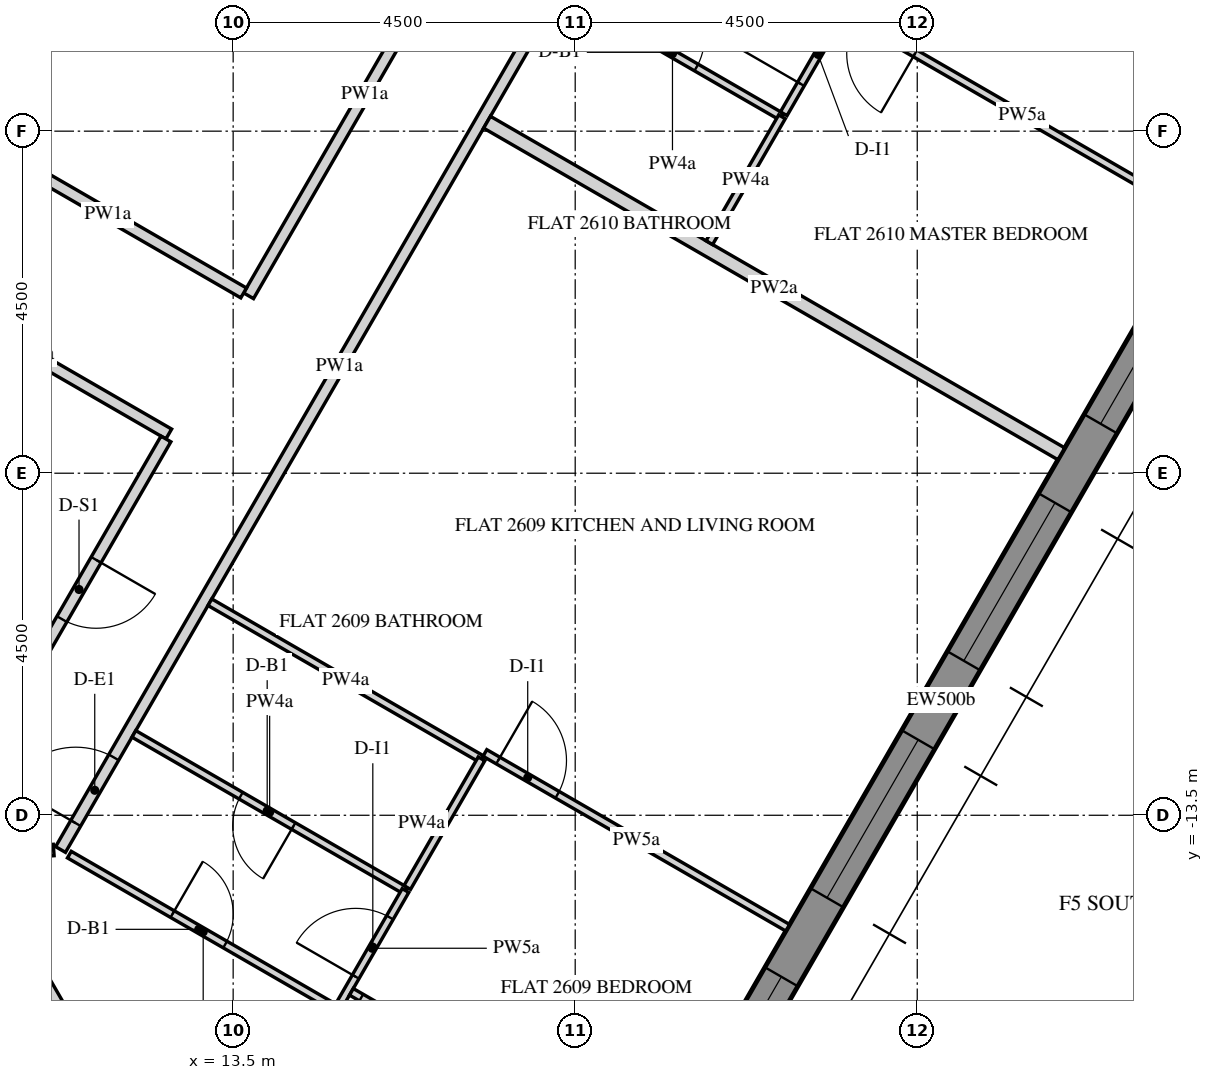
"""IFC4 building model, lengths in metres.
Left out: names, types, materials, properties, quantities, classifications, styles, units other than length and angle.
Written with IfcOpenShell. Run it as: python <this file> out.ifc"""

import sys

from ifc_helpers import new_model, si_unit, direction, frame, frame_2d, origin, place, context, subcontext, project, spatial, polyline, rectangle, outline, extrude, element, fill, save


model = new_model("IFC4")
c1 = context("Model", 3, precision=1e-05, world=origin(), true_north=direction((0.0, 1.0)))
c2 = subcontext(c1, "Body", "Model", "MODEL_VIEW")
j1 = project(units=[si_unit("LENGTHUNIT", "METRE"), si_unit("PLANEANGLEUNIT", "RADIAN")], contexts=[c1])
p1 = place(None, origin())
s1 = spatial("IfcSite", under=j1, at=p1, CompositionType="ELEMENT")
p2 = place(p1, origin())
s2 = spatial("IfcBuilding", under=s1, at=p2, CompositionType="ELEMENT")
p3 = place(p2, frame((0.0, 0.0, 334.2)))
s3 = spatial("IfcBuildingStorey", under=s2, at=p3, CompositionType="ELEMENT", Elevation=334.2)
p4 = place(p3, frame((16.451, -23.005, -0.15), z_axis=(0.0, 0.0, 1.0), x_axis=(0.500003737743, 0.866023245787, 0.0)))
e1 = element("IfcWall", 1, at=p4, inside=s3, PredefinedType="SOLIDWALL", context=c2, shape_type="SweptSolid", body=[
    extrude(outline(polyline([(-0.021, -0.25), (25.468, -0.25), (25.421, 0.25), (0.021, 0.25), (-0.021, -0.25)])), origin(), (0.0, 0.0, 1.0), 3.75),
])
p5 = place(p4, frame((2.522, 0.0, 0.75)))
e2 = element("IfcOpeningElement", 2, at=p5, cuts=e1, PredefinedType="OPENING", context=c2, shape_type="SweptSolid", body=[
    extrude(rectangle(XDim=2.4, YDim=2.7, at=frame_2d((1.2, 1.35))), frame((0.0, 0.26, 0.0), z_axis=(0.0, -1.0, 0.0), x_axis=(1.0, 0.0, 0.0)), (0.0, 0.0, 1.0), 0.52),
])
p6 = place(p4, frame((6.122, 0.0, 0.75)))
e3 = element("IfcOpeningElement", 3, at=p6, cuts=e1, PredefinedType="OPENING", context=c2, shape_type="SweptSolid", body=[
    extrude(rectangle(XDim=2.4, YDim=2.7, at=frame_2d((1.2, 1.35))), frame((0.0, 0.26, 0.0), z_axis=(0.0, -1.0, 0.0), x_axis=(1.0, 0.0, 0.0)), (0.0, 0.0, 1.0), 0.52),
])
p7 = place(p4, frame((9.722, 0.0, 0.75)))
e4 = element("IfcOpeningElement", 4, at=p7, cuts=e1, PredefinedType="OPENING", context=c2, shape_type="SweptSolid", body=[
    extrude(rectangle(XDim=2.4, YDim=2.7, at=frame_2d((1.2, 1.35))), frame((0.0, 0.26, 0.0), z_axis=(0.0, -1.0, 0.0), x_axis=(1.0, 0.0, 0.0)), (0.0, 0.0, 1.0), 0.52),
])
p8 = place(p4, frame((13.323, 0.0, 0.75)))
e5 = element("IfcOpeningElement", 5, at=p8, cuts=e1, PredefinedType="OPENING", context=c2, shape_type="SweptSolid", body=[
    extrude(rectangle(XDim=2.4, YDim=2.7, at=frame_2d((1.2, 1.35))), frame((0.0, 0.26, 0.0), z_axis=(0.0, -1.0, 0.0), x_axis=(1.0, 0.0, 0.0)), (0.0, 0.0, 1.0), 0.52),
])
p9 = place(p4, frame((16.922, 0.0, 0.75)))
e6 = element("IfcOpeningElement", 6, at=p9, cuts=e1, PredefinedType="OPENING", context=c2, shape_type="SweptSolid", body=[
    extrude(rectangle(XDim=2.4, YDim=2.7, at=frame_2d((1.2, 1.35))), frame((0.0, 0.26, 0.0), z_axis=(0.0, -1.0, 0.0), x_axis=(1.0, 0.0, 0.0)), (0.0, 0.0, 1.0), 0.52),
])
p10 = place(p4, frame((20.522, 0.0, 0.75)))
e7 = element("IfcOpeningElement", 7, at=p10, cuts=e1, PredefinedType="OPENING", context=c2, shape_type="SweptSolid", body=[
    extrude(rectangle(XDim=2.4, YDim=2.7, at=frame_2d((1.2, 1.35))), frame((0.0, 0.26, 0.0), z_axis=(0.0, -1.0, 0.0), x_axis=(1.0, 0.0, 0.0)), (0.0, 0.0, 1.0), 0.52),
])
p11 = place(p3, frame((6.235, -10.8, -0.15), z_axis=(0.0, 0.0, 1.0), x_axis=(0.499996419489, 0.866027470984, 0.0)))
e8 = element("IfcWall", 8, at=p11, inside=s3, PredefinedType="SHEAR", context=c2, shape_type="SweptSolid", body=[
    extrude(outline(polyline([(-0.115, -0.2), (12.586, -0.2), (12.355, 0.2), (0.115, 0.2), (-0.115, -0.2)])), origin(), (0.0, 0.0, 1.0), 3.75),
])
p12 = place(p11, frame((5.364, 0.0, 0.15)))
e9 = element("IfcOpeningElement", 9, at=p12, cuts=e8, PredefinedType="OPENING", context=c2, shape_type="SweptSolid", body=[
    extrude(rectangle(XDim=1.8, YDim=2.4, at=frame_2d((0.9, 1.2))), frame((0.0, 0.21, 0.0), z_axis=(0.0, -1.0, 0.0), x_axis=(1.0, 0.0, 0.0)), (0.0, 0.0, 1.0), 0.42),
])
p13 = place(p3, frame((6.351, -11.0, -0.15), z_axis=(0.0, 0.0, 1.0), x_axis=(0.499998894578, -0.866026041999, 0.0)))
e10 = element("IfcWall", 10, at=p13, inside=s3, PredefinedType="SHEAR", context=c2, shape_type="SweptSolid", body=[
    extrude(rectangle(XDim=15.544, YDim=0.4, at=frame_2d((7.772, 0.0))), origin(), (0.0, 0.0, 1.0), 3.75),
])
p14 = place(p13, frame((6.872, 0.0, 0.15)))
e11 = element("IfcOpeningElement", 11, at=p14, cuts=e10, PredefinedType="OPENING", context=c2, shape_type="SweptSolid", body=[
    extrude(rectangle(XDim=1.8, YDim=2.4, at=frame_2d((0.9, 1.2))), frame((0.0, 0.21, 0.0), z_axis=(0.0, -1.0, 0.0), x_axis=(1.0, 0.0, 0.0)), (0.0, 0.0, 1.0), 0.42),
])
p15 = place(p3, frame((11.229, -13.951, 0.0), z_axis=(0.0, 0.0, 1.0), x_axis=(0.499997948852, 0.866026588012, 0.0)))
e12 = element("IfcWall", 12, at=p15, inside=s3, PredefinedType="PARTITIONING", context=c2, shape_type="SweptSolid", body=[
    extrude(rectangle(XDim=14.677, YDim=0.15, at=frame_2d((7.339, 0.0))), origin(), (0.0, 0.0, 1.0), 2.838),
])
p16 = place(p15, frame((0.4, 0.0, 0.0)))
e13 = element("IfcOpeningElement", 13, at=p16, cuts=e12, PredefinedType="OPENING", context=c2, shape_type="SweptSolid", body=[
    extrude(rectangle(XDim=1.0, YDim=2.1, at=frame_2d((0.5, 1.05))), frame((0.0, 0.085, 0.0), z_axis=(0.0, -1.0, 0.0), x_axis=(1.0, 0.0, 0.0)), (0.0, 0.0, 1.0), 0.17),
])
p17 = place(p15, frame((13.527, 0.0, 0.0)))
e14 = element("IfcOpeningElement", 14, at=p17, cuts=e12, PredefinedType="OPENING", context=c2, shape_type="SweptSolid", body=[
    extrude(rectangle(XDim=1.0, YDim=2.1, at=frame_2d((0.5, 1.05))), frame((0.0, 0.085, 0.0), z_axis=(0.0, -1.0, 0.0), x_axis=(1.0, 0.0, 0.0)), (0.0, 0.0, 1.0), 0.17),
])
p18 = place(p3, frame((11.337, -16.236, 0.0), z_axis=(0.0, 0.0, 1.0), x_axis=(-0.500029781311, 0.866008208854, 0.0)))
e15 = element("IfcWall", 15, at=p18, inside=s3, PredefinedType="PARTITIONING", context=c2, shape_type="SweptSolid", body=[
    extrude(rectangle(XDim=2.544, YDim=0.15, at=frame_2d((1.272, 0.0))), origin(), (0.0, 0.0, 1.0), 2.838),
])
p19 = place(p3, frame((10.148, -14.026, 0.0), z_axis=(0.0, 0.0, 1.0), x_axis=(0.99756238904, 0.069780226228, 0.0)))
e16 = element("IfcWall", 16, at=p19, inside=s3, PredefinedType="PARTITIONING", context=c2, shape_type="SweptSolid", body=[
    extrude(rectangle(XDim=0.994, YDim=0.15, at=frame_2d((0.497, 0.0))), origin(), (0.0, 0.0, 1.0), 2.838),
])
p20 = place(p3, frame((9.016, -6.384, 0.0), z_axis=(0.0, 0.0, 1.0), x_axis=(0.866023935413, -0.500002543286, 0.0)))
e17 = element("IfcWall", 17, at=p20, inside=s3, PredefinedType="PARTITIONING", context=c2, shape_type="SweptSolid", body=[
    extrude(rectangle(XDim=4.2, YDim=0.15, at=frame_2d((2.1, 0.0))), origin(), (0.0, 0.0, 1.0), 2.838),
])
p21 = place(p3, frame((12.615, -8.549, 0.0), z_axis=(0.0, 0.0, 1.0), x_axis=(-0.499985850067, -0.866033573098, 0.0)))
e18 = element("IfcWall", 18, at=p21, inside=s3, PredefinedType="PARTITIONING", context=c2, shape_type="SweptSolid", body=[
    extrude(rectangle(XDim=4.573, YDim=0.15, at=frame_2d((2.287, 0.0))), origin(), (0.0, 0.0, 1.0), 2.838),
])
p22 = place(p21, frame((1.837, 0.0, 0.0)))
e19 = element("IfcOpeningElement", 19, at=p22, cuts=e18, PredefinedType="OPENING", context=c2, shape_type="SweptSolid", body=[
    extrude(rectangle(XDim=0.9, YDim=2.1, at=frame_2d((0.45, 1.05))), frame((0.0, 0.085, 0.0), z_axis=(0.0, -1.0, 0.0), x_axis=(1.0, 0.0, 0.0)), (0.0, 0.0, 1.0), 0.17),
])
p23 = place(p3, frame((16.758, -1.374, 0.0), z_axis=(0.0, 0.0, 1.0), x_axis=(-0.499980689202, -0.866036552592, 0.0)))
e20 = element("IfcWall", 20, at=p23, inside=s3, PredefinedType="PARTITIONING", context=c2, shape_type="SweptSolid", body=[
    extrude(rectangle(XDim=6.111, YDim=0.15, at=frame_2d((3.055, 0.0))), origin(), (0.0, 0.0, 1.0), 2.838),
])
p24 = place(p3, frame((13.638, -6.628, 0.0), z_axis=(0.0, 0.0, 1.0), x_axis=(-0.866034795751, 0.499983732284, 0.0)))
e21 = element("IfcWall", 21, at=p24, inside=s3, PredefinedType="PARTITIONING", context=c2, shape_type="SweptSolid", body=[
    extrude(rectangle(XDim=4.125, YDim=0.15, at=frame_2d((2.062, 0.0))), origin(), (0.0, 0.0, 1.0), 2.838),
])
p25 = place(p3, frame((13.194, -10.697, 0.0), z_axis=(0.0, 0.0, 1.0), x_axis=(0.866019999656, -0.500009360108, 0.0)))
e22 = element("IfcWall", 22, at=p25, inside=s3, PredefinedType="PARTITIONING", context=c2, shape_type="SweptSolid", body=[
    extrude(rectangle(XDim=4.125, YDim=0.1, at=frame_2d((2.062, 0.0))), origin(), (0.0, 0.0, 1.0), 2.838),
])
p26 = place(p3, frame((16.812, -12.68, 0.0), z_axis=(0.0, 0.0, 1.0), x_axis=(0.866030038822, -0.499991971794, 0.0)))
e23 = element("IfcWall", 23, at=p26, inside=s3, PredefinedType="PARTITIONING", context=c2, shape_type="SweptSolid", body=[
    extrude(rectangle(XDim=4.6, YDim=0.1, at=frame_2d((2.3, 0.0))), origin(), (0.0, 0.0, 1.0), 2.838),
])
p27 = place(p26, frame((0.2, 0.0, 0.0)))
e24 = element("IfcOpeningElement", 24, at=p27, cuts=e23, PredefinedType="OPENING", context=c2, shape_type="SweptSolid", body=[
    extrude(rectangle(XDim=0.9, YDim=2.1, at=frame_2d((0.45, 1.05))), frame((0.0, 0.06, 0.0), z_axis=(0.0, -1.0, 0.0), x_axis=(1.0, 0.0, 0.0)), (0.0, 0.0, 1.0), 0.12),
])
p28 = place(p3, frame((24.396, -8.745, 0.0), z_axis=(0.0, 0.0, 1.0), x_axis=(-0.866018297078, 0.500012308975, 0.0)))
e25 = element("IfcWall", 25, at=p28, inside=s3, PredefinedType="PARTITIONING", context=c2, shape_type="SweptSolid", body=[
    extrude(rectangle(XDim=8.725, YDim=0.18, at=frame_2d((4.362, 0.0))), origin(), (0.0, 0.0, 1.0), 2.838),
])
p29 = place(p3, frame((15.766, -14.492, 0.0), z_axis=(0.0, 0.0, 1.0), x_axis=(-0.866019999656, 0.500009360108, 0.0)))
e26 = element("IfcWall", 26, at=p29, inside=s3, PredefinedType="PARTITIONING", context=c2, shape_type="SweptSolid", body=[
    extrude(rectangle(XDim=4.125, YDim=0.1, at=frame_2d((2.062, 0.0))), origin(), (0.0, 0.0, 1.0), 2.838),
])
p30 = place(p29, frame((1.7, 0.0, 0.0)))
e27 = element("IfcOpeningElement", 27, at=p30, cuts=e26, PredefinedType="OPENING", context=c2, shape_type="SweptSolid", body=[
    extrude(rectangle(XDim=0.8, YDim=2.1, at=frame_2d((0.4, 1.05))), frame((0.0, 0.06, 0.0), z_axis=(0.0, -1.0, 0.0), x_axis=(1.0, 0.0, 0.0)), (0.0, 0.0, 1.0), 0.12),
])
p31 = place(p3, frame((14.89, -16.009, 0.0), z_axis=(0.0, 0.0, 1.0), x_axis=(0.499971461383, 0.866041879935, 0.0)))
e28 = element("IfcWall", 28, at=p31, inside=s3, PredefinedType="PARTITIONING", context=c2, shape_type="SweptSolid", body=[
    extrude(rectangle(XDim=1.754, YDim=0.1, at=frame_2d((0.877, 0.0))), origin(), (0.0, 0.0, 1.0), 2.838),
])
p32 = place(p31, frame((0.444, 0.0, 0.0)))
e29 = element("IfcOpeningElement", 29, at=p32, cuts=e28, PredefinedType="OPENING", context=c2, shape_type="SweptSolid", body=[
    extrude(rectangle(XDim=0.9, YDim=2.1, at=frame_2d((0.45, 1.05))), frame((0.0, 0.06, 0.0), z_axis=(0.0, -1.0, 0.0), x_axis=(1.0, 0.0, 0.0)), (0.0, 0.0, 1.0), 0.12),
])
p33 = place(p3, frame((11.345, -14.018, 0.0), z_axis=(0.0, 0.0, 1.0), x_axis=(0.866028600041, -0.49999446388, 0.0)))
e30 = element("IfcWall", 30, at=p33, inside=s3, PredefinedType="PARTITIONING", context=c2, shape_type="SweptSolid", body=[
    extrude(rectangle(XDim=4.066, YDim=0.1, at=frame_2d((2.033, 0.0))), origin(), (0.0, 0.0, 1.0), 2.838),
])
p34 = place(p33, frame((1.566, 0.0, 0.0)))
e31 = element("IfcOpeningElement", 31, at=p34, cuts=e30, PredefinedType="OPENING", context=c2, shape_type="SweptSolid", body=[
    extrude(rectangle(XDim=0.8, YDim=2.1, at=frame_2d((0.4, 1.05))), frame((0.0, 0.06, 0.0), z_axis=(0.0, -1.0, 0.0), x_axis=(1.0, 0.0, 0.0)), (0.0, 0.0, 1.0), 0.12),
])
p35 = place(p3, frame((15.79, -14.45, 0.0), z_axis=(0.0, 0.0, 1.0), x_axis=(0.500036104519, 0.866004557827, 0.0)))
e32 = element("IfcWall", 32, at=p35, inside=s3, PredefinedType="PARTITIONING", context=c2, shape_type="SweptSolid", body=[
    extrude(rectangle(XDim=1.954, YDim=0.1, at=frame_2d((0.977, 0.0))), origin(), (0.0, 0.0, 1.0), 2.838),
])
p36 = place(p3, frame((18.996, -18.098, 0.0), z_axis=(0.0, 0.0, 1.0), x_axis=(-0.866035472144, 0.499982560684, 0.0)))
e33 = element("IfcWall", 33, at=p36, inside=s3, PredefinedType="PARTITIONING", context=c2, shape_type="SweptSolid", body=[
    extrude(rectangle(XDim=4.55, YDim=0.1, at=frame_2d((2.275, 0.0))), origin(), (0.0, 0.0, 1.0), 2.838),
])
p37 = place(p36, frame((3.5, 0.0, 0.0)))
e34 = element("IfcOpeningElement", 34, at=p37, cuts=e33, PredefinedType="OPENING", context=c2, shape_type="SweptSolid", body=[
    extrude(rectangle(XDim=0.9, YDim=2.1, at=frame_2d((0.45, 1.05))), frame((0.0, 0.06, 0.0), z_axis=(0.0, -1.0, 0.0), x_axis=(1.0, 0.0, 0.0)), (0.0, 0.0, 1.0), 0.12),
])
p38 = place(p3, frame((17.84, -2.65, 0.0), z_axis=(0.0, 0.0, 1.0), x_axis=(0.866002163101, -0.500040251884, 0.0)))
e35 = element("IfcWall", 35, at=p38, inside=s3, PredefinedType="PARTITIONING", context=c2, shape_type="SweptSolid", body=[
    extrude(rectangle(XDim=3.325, YDim=0.1, at=frame_2d((1.663, 0.0))), origin(), (0.0, 0.0, 1.0), 2.838),
])
p39 = place(p38, frame((1.225, 0.0, 0.0)))
e36 = element("IfcOpeningElement", 36, at=p39, cuts=e35, PredefinedType="OPENING", context=c2, shape_type="SweptSolid", body=[
    extrude(rectangle(XDim=0.8, YDim=2.1, at=frame_2d((0.4, 1.05))), frame((0.0, 0.06, 0.0), z_axis=(0.0, -1.0, 0.0), x_axis=(1.0, 0.0, 0.0)), (0.0, 0.0, 1.0), 0.12),
])
p40 = place(p3, frame((20.743, -4.271, 0.0), z_axis=(0.0, 0.0, 1.0), x_axis=(0.500014808323, 0.866016854026, 0.0)))
e37 = element("IfcWall", 37, at=p40, inside=s3, PredefinedType="PARTITIONING", context=c2, shape_type="SweptSolid", body=[
    extrude(rectangle(XDim=2.554, YDim=0.1, at=frame_2d((1.277, 0.0))), origin(), (0.0, 0.0, 1.0), 2.838),
])
p41 = place(p40, frame((0.452, 0.0, 0.0)))
e38 = element("IfcOpeningElement", 38, at=p41, cuts=e37, PredefinedType="OPENING", context=c2, shape_type="SweptSolid", body=[
    extrude(rectangle(XDim=0.9, YDim=2.1, at=frame_2d((0.45, 1.05))), frame((0.0, 0.06, 0.0), z_axis=(0.0, -1.0, 0.0), x_axis=(1.0, 0.0, 0.0)), (0.0, 0.0, 1.0), 0.12),
])
p42 = place(p3, frame((19.764, -5.967, 0.0), z_axis=(0.0, 0.0, 1.0), x_axis=(0.500039310002, 0.866002706955, 0.0)))
e39 = element("IfcWall", 39, at=p42, inside=s3, PredefinedType="PARTITIONING", context=c2, shape_type="SweptSolid", body=[
    extrude(rectangle(XDim=1.912, YDim=0.1, at=frame_2d((0.956, 0.0))), origin(), (0.0, 0.0, 1.0), 2.838),
])
p43 = place(p3, frame((26.196, -5.627, 0.0), z_axis=(0.0, 0.0, 1.0), x_axis=(-0.866024483152, 0.500001594578, 0.0)))
e40 = element("IfcWall", 40, at=p43, inside=s3, PredefinedType="PARTITIONING", context=c2, shape_type="SweptSolid", body=[
    extrude(rectangle(XDim=5.35, YDim=0.1, at=frame_2d((2.675, 0.0))), origin(), (0.0, 0.0, 1.0), 2.838),
])
p44 = place(p43, frame((4.3, 0.0, 0.0)))
e41 = element("IfcOpeningElement", 41, at=p44, cuts=e40, PredefinedType="OPENING", context=c2, shape_type="SweptSolid", body=[
    extrude(rectangle(XDim=0.9, YDim=2.1, at=frame_2d((0.45, 1.05))), frame((0.0, 0.06, 0.0), z_axis=(0.0, -1.0, 0.0), x_axis=(1.0, 0.0, 0.0)), (0.0, 0.0, 1.0), 0.12),
])
p45 = place(p6, frame((0.0, 0.18, 0.0)))
e42 = element("IfcWindow", 42, at=p45, inside=s3, PartitioningType="DOUBLE_PANEL_VERTICAL", PredefinedType="WINDOW", context=c2, shape_type="SweptSolid", body=[
    extrude(rectangle(XDim=2.4, YDim=2.7, at=frame_2d((1.2, 1.35))), frame((0.0, 0.03, 0.0), z_axis=(0.0, -1.0, 0.0), x_axis=(1.0, 0.0, 0.0)), (0.0, 0.0, 1.0), 0.06),
])
fill(e3, e42)
p46 = place(p7, frame((0.0, 0.18, 0.0)))
e43 = element("IfcWindow", 43, at=p46, inside=s3, PartitioningType="DOUBLE_PANEL_VERTICAL", PredefinedType="WINDOW", context=c2, shape_type="SweptSolid", body=[
    extrude(rectangle(XDim=2.4, YDim=2.7, at=frame_2d((1.2, 1.35))), frame((0.0, 0.03, 0.0), z_axis=(0.0, -1.0, 0.0), x_axis=(1.0, 0.0, 0.0)), (0.0, 0.0, 1.0), 0.06),
])
fill(e4, e43)
p47 = place(p8, frame((0.0, 0.18, 0.0)))
e44 = element("IfcWindow", 44, at=p47, inside=s3, PartitioningType="DOUBLE_PANEL_VERTICAL", PredefinedType="WINDOW", context=c2, shape_type="SweptSolid", body=[
    extrude(rectangle(XDim=2.4, YDim=2.7, at=frame_2d((1.2, 1.35))), frame((0.0, 0.03, 0.0), z_axis=(0.0, -1.0, 0.0), x_axis=(1.0, 0.0, 0.0)), (0.0, 0.0, 1.0), 0.06),
])
fill(e5, e44)
p48 = place(p9, frame((0.0, 0.18, 0.0)))
e45 = element("IfcWindow", 45, at=p48, inside=s3, PartitioningType="DOUBLE_PANEL_VERTICAL", PredefinedType="WINDOW", context=c2, shape_type="SweptSolid", body=[
    extrude(rectangle(XDim=2.4, YDim=2.7, at=frame_2d((1.2, 1.35))), frame((0.0, 0.03, 0.0), z_axis=(0.0, -1.0, 0.0), x_axis=(1.0, 0.0, 0.0)), (0.0, 0.0, 1.0), 0.06),
])
fill(e6, e45)
p49 = place(p16, origin())
e46 = element("IfcDoor", 46, at=p49, inside=s3, OperationType="SINGLE_SWING_RIGHT", PredefinedType="DOOR", context=c2, shape_type="SweptSolid", body=[
    extrude(rectangle(XDim=1.0, YDim=2.1, at=frame_2d((0.5, 1.05))), frame((0.0, 0.025, 0.0), z_axis=(0.0, -1.0, 0.0), x_axis=(1.0, 0.0, 0.0)), (0.0, 0.0, 1.0), 0.05),
])
fill(e13, e46)
p50 = place(p30, origin())
e47 = element("IfcDoor", 47, at=p50, inside=s3, OperationType="SINGLE_SWING_LEFT", PredefinedType="DOOR", context=c2, shape_type="SweptSolid", body=[
    extrude(rectangle(XDim=0.8, YDim=2.1, at=frame_2d((0.4, 1.05))), frame((0.0, 0.025, 0.0), z_axis=(0.0, -1.0, 0.0), x_axis=(1.0, 0.0, 0.0)), (0.0, 0.0, 1.0), 0.05),
])
fill(e27, e47)
p51 = place(p32, origin())
e48 = element("IfcDoor", 48, at=p51, inside=s3, OperationType="SINGLE_SWING_RIGHT", PredefinedType="DOOR", context=c2, shape_type="SweptSolid", body=[
    extrude(rectangle(XDim=0.9, YDim=2.1, at=frame_2d((0.45, 1.05))), frame((0.0, 0.025, 0.0), z_axis=(0.0, -1.0, 0.0), x_axis=(1.0, 0.0, 0.0)), (0.0, 0.0, 1.0), 0.05),
])
fill(e29, e48)
p52 = place(p37, origin())
e49 = element("IfcDoor", 49, at=p52, inside=s3, OperationType="SINGLE_SWING_RIGHT", PredefinedType="DOOR", context=c2, shape_type="SweptSolid", body=[
    extrude(rectangle(XDim=0.9, YDim=2.1, at=frame_2d((0.45, 1.05))), frame((0.0, 0.025, 0.0), z_axis=(0.0, -1.0, 0.0), x_axis=(1.0, 0.0, 0.0)), (0.0, 0.0, 1.0), 0.05),
])
fill(e34, e49)
p53 = place(p27, origin())
e50 = element("IfcDoor", 50, at=p53, inside=s3, OperationType="SINGLE_SWING_RIGHT", PredefinedType="DOOR", context=c2, shape_type="SweptSolid", body=[
    extrude(rectangle(XDim=0.9, YDim=2.1, at=frame_2d((0.45, 1.05))), frame((0.0, 0.025, 0.0), z_axis=(0.0, -1.0, 0.0), x_axis=(1.0, 0.0, 0.0)), (0.0, 0.0, 1.0), 0.05),
])
fill(e24, e50)
p54 = place(p34, origin())
e51 = element("IfcDoor", 51, at=p54, inside=s3, OperationType="SINGLE_SWING_RIGHT", PredefinedType="DOOR", context=c2, shape_type="SweptSolid", body=[
    extrude(rectangle(XDim=0.8, YDim=2.1, at=frame_2d((0.4, 1.05))), frame((0.0, 0.025, 0.0), z_axis=(0.0, -1.0, 0.0), x_axis=(1.0, 0.0, 0.0)), (0.0, 0.0, 1.0), 0.05),
])
fill(e31, e51)
p55 = place(p39, origin())
e52 = element("IfcDoor", 52, at=p55, inside=s3, OperationType="SINGLE_SWING_RIGHT", PredefinedType="DOOR", context=c2, shape_type="SweptSolid", body=[
    extrude(rectangle(XDim=0.8, YDim=2.1, at=frame_2d((0.4, 1.05))), frame((0.0, 0.025, 0.0), z_axis=(0.0, -1.0, 0.0), x_axis=(1.0, 0.0, 0.0)), (0.0, 0.0, 1.0), 0.05),
])
fill(e36, e52)
p56 = place(p41, origin())
e53 = element("IfcDoor", 53, at=p56, inside=s3, OperationType="SINGLE_SWING_LEFT", PredefinedType="DOOR", context=c2, shape_type="SweptSolid", body=[
    extrude(rectangle(XDim=0.9, YDim=2.1, at=frame_2d((0.45, 1.05))), frame((0.0, 0.025, 0.0), z_axis=(0.0, -1.0, 0.0), x_axis=(1.0, 0.0, 0.0)), (0.0, 0.0, 1.0), 0.05),
])
fill(e38, e53)
p57 = place(p44, origin())
e54 = element("IfcDoor", 54, at=p57, inside=s3, OperationType="SINGLE_SWING_RIGHT", PredefinedType="DOOR", context=c2, shape_type="SweptSolid", body=[
    extrude(rectangle(XDim=0.9, YDim=2.1, at=frame_2d((0.45, 1.05))), frame((0.0, 0.025, 0.0), z_axis=(0.0, -1.0, 0.0), x_axis=(1.0, 0.0, 0.0)), (0.0, 0.0, 1.0), 0.05),
])
fill(e41, e54)
p58 = place(p22, origin())
e55 = element("IfcDoor", 55, at=p58, inside=s3, OperationType="SINGLE_SWING_LEFT", PredefinedType="DOOR", context=c2, shape_type="SweptSolid", body=[
    extrude(rectangle(XDim=0.9, YDim=2.1, at=frame_2d((0.45, 1.05))), frame((0.0, 0.025, 0.0), z_axis=(0.0, -1.0, 0.0), x_axis=(1.0, 0.0, 0.0)), (0.0, 0.0, 1.0), 0.05),
])
fill(e19, e55)
save(model, sys.argv[1])
